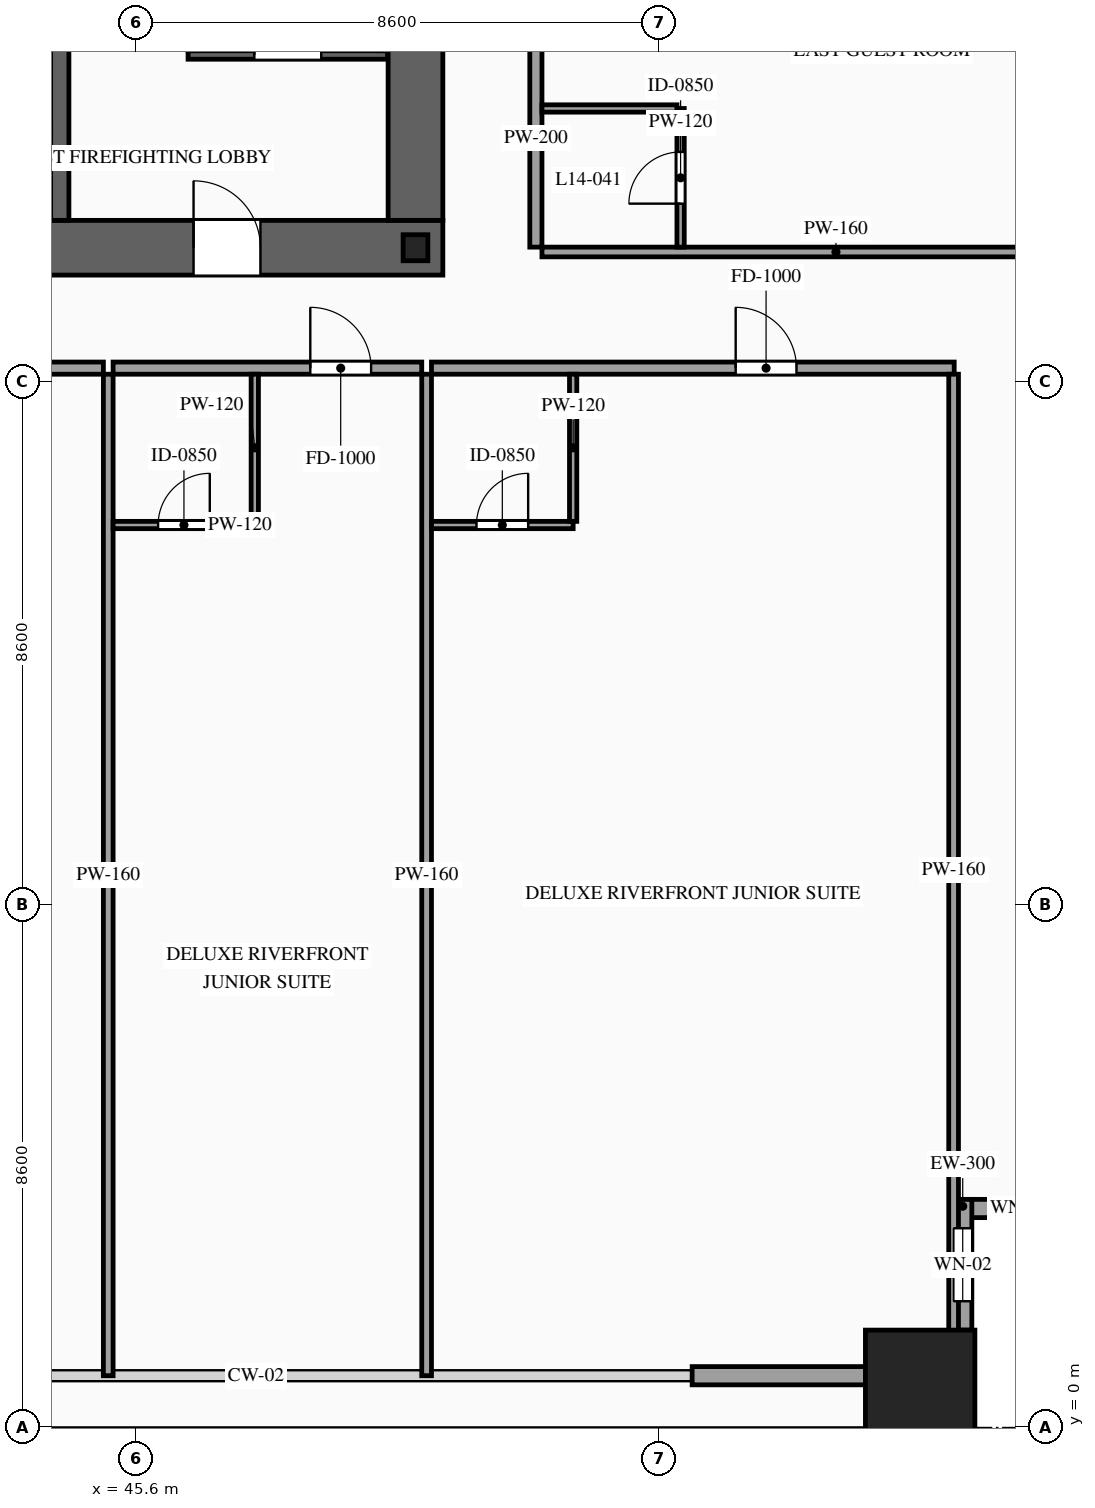
"""IFC4 building model, lengths in metres.
Left out: names, types, materials, properties, quantities, classifications, styles, units other than length and angle.
Written with IfcOpenShell. Run it as: python <this file> out.ifc"""

import sys

from ifc_helpers import new_model, si_unit, direction, frame, frame_2d, origin, origin_2d, place, context, subcontext, project, spatial, rectangle, hollow_rectangle, i_section, extrude, source, transform, mapped, element, fill, save


model = new_model("IFC4")
c1 = context("Model", 3, precision=1e-05, world=origin(), true_north=direction((0.0, 1.0)))
c2 = subcontext(c1, "Body", "Model", "MODEL_VIEW")
j1 = project(units=[si_unit("LENGTHUNIT", "METRE"), si_unit("PLANEANGLEUNIT", "RADIAN")], contexts=[c1])
p1 = place(None, origin())
s1 = spatial("IfcSite", under=j1, at=p1, CompositionType="ELEMENT")
p2 = place(p1, origin())
s2 = spatial("IfcBuilding", under=s1, at=p2, CompositionType="ELEMENT")
p3 = place(p2, frame((0.0, 0.0, 56.8)))
s3 = spatial("IfcBuildingStorey", under=s2, at=p3, CompositionType="ELEMENT", Elevation=56.8)
p4 = place(p3, frame((23.35, 19.4, 0.0), z_axis=(0.0, 0.0, 1.0), x_axis=(1.0, 0.0, 0.0)))
e1 = element("IfcWall", 1, at=p4, inside=s3, PredefinedType="SHEAR", context=c2, shape_type="SweptSolid", body=[
    extrude(rectangle(XDim=27.3, YDim=0.9, at=frame_2d((13.65, 0.0))), origin(), (0.0, 0.0, 1.0), 3.6),
])
p5 = place(p4, frame((2.1, 0.0, 0.0)))
e2 = element("IfcOpeningElement", 2, at=p5, cuts=e1, PredefinedType="OPENING", context=c2, shape_type="SweptSolid", body=[
    extrude(rectangle(XDim=1.1, YDim=2.2, at=frame_2d((0.55, 1.1))), frame((0.0, 0.465, 0.0), z_axis=(0.0, -1.0, 0.0), x_axis=(1.0, 0.0, 0.0)), (0.0, 0.0, 1.0), 0.93),
])
p6 = place(p4, frame((10.0, 0.0, 0.0)))
e3 = element("IfcOpeningElement", 3, at=p6, cuts=e1, PredefinedType="OPENING", context=c2, shape_type="SweptSolid", body=[
    extrude(rectangle(XDim=1.1, YDim=2.2, at=frame_2d((0.55, 1.1))), frame((0.0, 0.465, 0.0), z_axis=(0.0, -1.0, 0.0), x_axis=(1.0, 0.0, 0.0)), (0.0, 0.0, 1.0), 0.93),
])
p7 = place(p4, frame((23.2, 0.0, 0.0)))
e4 = element("IfcOpeningElement", 4, at=p7, cuts=e1, PredefinedType="OPENING", context=c2, shape_type="SweptSolid", body=[
    extrude(rectangle(XDim=1.1, YDim=2.2, at=frame_2d((0.55, 1.1))), frame((0.0, 0.465, 0.0), z_axis=(0.0, -1.0, 0.0), x_axis=(1.0, 0.0, 0.0)), (0.0, 0.0, 1.0), 0.93),
])
p8 = place(p4, frame((19.82, 0.0, 0.0)))
e5 = element("IfcOpeningElement", 5, at=p8, cuts=e1, PredefinedType="OPENING", context=c2, shape_type="SweptSolid", body=[
    extrude(rectangle(XDim=0.9, YDim=2.15, at=frame_2d((0.45, 1.075))), frame((0.0, 0.465, 0.0), z_axis=(0.0, -1.0, 0.0), x_axis=(1.0, 0.0, 0.0)), (0.0, 0.0, 1.0), 0.93),
])
p9 = place(p4, frame((18.38, 0.0, 0.0)))
e6 = element("IfcOpeningElement", 6, at=p9, cuts=e1, PredefinedType="OPENING", context=c2, shape_type="SweptSolid", body=[
    extrude(rectangle(XDim=0.9, YDim=2.15, at=frame_2d((0.45, 1.075))), frame((0.0, 0.465, 0.0), z_axis=(0.0, -1.0, 0.0), x_axis=(1.0, 0.0, 0.0)), (0.0, 0.0, 1.0), 0.93),
])
m1 = source(origin(), c2, "Body", "SweptSolid", [
    extrude(rectangle(XDim=11.9, YDim=0.9, at=frame_2d((5.95, 0.0))), origin(), (0.0, 0.0, 1.0), 3.6),
])
p10 = place(p3, frame((50.2, 19.85, 0.0), z_axis=(0.0, 0.0, 1.0), x_axis=(0.0, 1.0, 0.0)))
e7 = element("IfcWall", 7, at=p10, inside=s3, PredefinedType="SHEAR", context=c2, shape_type="MappedRepresentation", body=[
    mapped(m1, transform((0.0, 0.0, 0.0), scale=1.0)),
])
m2 = source(origin(), c2, "Body", "SweptSolid", [
    extrude(rectangle(XDim=11.9, YDim=0.3, at=frame_2d((5.95, 0.0))), origin(), (0.0, 0.0, 1.0), 3.6),
])
p11 = place(p3, frame((44.35, 19.85, 0.0), z_axis=(0.0, 0.0, 1.0), x_axis=(0.0, 1.0, 0.0)))
e8 = element("IfcWall", 8, at=p11, inside=s3, PredefinedType="SOLIDWALL", context=c2, shape_type="MappedRepresentation", body=[
    mapped(m2, transform((0.0, 0.0, 0.0), scale=1.0)),
])
m3 = source(origin(), c2, "Body", "SweptSolid", [
    extrude(i_section(OverallWidth=0.407, OverallDepth=0.428, WebThickness=0.02, FlangeThickness=0.035, at=origin_2d()), origin(), (0.0, 0.0, 1.0), 3.6),
])
p12 = place(p3, frame((50.2, 19.4, 0.0), z_axis=(0.0, 0.0, 1.0), x_axis=(1.0, 0.0, 0.0)))
e9 = element("IfcColumn", 9, at=p12, inside=s3, PredefinedType="COLUMN", context=c2, shape_type="MappedRepresentation", body=[
    mapped(m3, transform((0.0, 0.0, 0.0), scale=1.0)),
])
m4 = source(origin(), c2, "Body", "SweptSolid", [
    extrude(hollow_rectangle(XDim=1.8, YDim=1.8, WallThickness=0.08, at=origin_2d()), origin(), (0.0, 0.0, 1.0), 3.6),
])
p13 = place(p3, frame((58.5, 0.7, 0.0), z_axis=(0.0, 0.0, 1.0), x_axis=(1.0, 0.0, 0.0)))
e10 = element("IfcColumn", 10, at=p13, inside=s3, PredefinedType="COLUMN", context=c2, shape_type="MappedRepresentation", body=[
    mapped(m4, transform((0.0, 0.0, 0.0), scale=1.0)),
])
p14 = place(p3, frame((59.05, 3.6, 0.0), z_axis=(0.0, 0.0, 1.0), x_axis=(1.0, 0.0, 0.0)))
e11 = element("IfcWall", 11, at=p14, inside=s3, PredefinedType="SOLIDWALL", context=c2, shape_type="SweptSolid", body=[
    extrude(rectangle(XDim=2.15, YDim=0.3, at=frame_2d((1.075, 0.0))), origin(), (0.0, 0.0, 1.0), 3.38),
])
p15 = place(p14, frame((0.625, 0.0, 0.85)))
e12 = element("IfcOpeningElement", 12, at=p15, cuts=e11, PredefinedType="OPENING", context=c2, shape_type="SweptSolid", body=[
    extrude(rectangle(XDim=0.9, YDim=1.5, at=frame_2d((0.45, 0.75))), frame((0.0, 0.165, 0.0), z_axis=(0.0, -1.0, 0.0), x_axis=(1.0, 0.0, 0.0)), (0.0, 0.0, 1.0), 0.33),
])
p16 = place(p3, frame((59.2, 1.6, 0.0), z_axis=(0.0, 0.0, 1.0), x_axis=(0.0, 1.0, 0.0)))
e13 = element("IfcWall", 13, at=p16, inside=s3, PredefinedType="SOLIDWALL", context=c2, shape_type="SweptSolid", body=[
    extrude(rectangle(XDim=2.15, YDim=0.3, at=frame_2d((1.075, 0.0))), origin(), (0.0, 0.0, 1.0), 3.38),
])
p17 = place(p16, frame((0.475, 0.0, 0.85)))
e14 = element("IfcOpeningElement", 14, at=p17, cuts=e13, PredefinedType="OPENING", context=c2, shape_type="SweptSolid", body=[
    extrude(rectangle(XDim=1.2, YDim=2.1, at=frame_2d((0.6, 1.05))), frame((0.0, 0.165, 0.0), z_axis=(0.0, -1.0, 0.0), x_axis=(1.0, 0.0, 0.0)), (0.0, 0.0, 1.0), 0.33),
])
m5 = source(origin(), c2, "Body", "SweptSolid", [
    extrude(rectangle(XDim=2.85, YDim=0.3, at=frame_2d((1.425, 0.0))), origin(), (0.0, 0.0, 1.0), 2.775),
])
p18 = place(p3, frame((54.75, 0.85, 0.0), z_axis=(0.0, 0.0, 1.0), x_axis=(1.0, 0.0, 0.0)))
e15 = element("IfcWall", 15, at=p18, inside=s3, PredefinedType="SOLIDWALL", context=c2, shape_type="MappedRepresentation", body=[
    mapped(m5, transform((0.0, 0.0, 0.0), scale=1.0)),
])
p19 = place(p3, frame((46.46, 22.57, 0.0), z_axis=(0.0, 0.0, 1.0), x_axis=(1.0, 0.0, 0.0)))
e16 = element("IfcWall", 16, at=p19, inside=s3, PredefinedType="SOLIDWALL", context=c2, shape_type="SweptSolid", body=[
    extrude(rectangle(XDim=3.28, YDim=0.14, at=frame_2d((1.64, 0.0))), origin(), (0.0, 0.0, 1.0), 3.38),
])
p20 = place(p19, frame((1.09, 0.0, 0.0)))
e17 = element("IfcOpeningElement", 17, at=p20, cuts=e16, PredefinedType="OPENING", context=c2, shape_type="SweptSolid", body=[
    extrude(rectangle(XDim=1.1, YDim=2.2, at=frame_2d((0.55, 1.1))), frame((0.0, 0.085, 0.0), z_axis=(0.0, -1.0, 0.0), x_axis=(1.0, 0.0, 0.0)), (0.0, 0.0, 1.0), 0.17),
])
p21 = place(p3, frame((35.756, 17.42, 0.0), z_axis=(0.0, 0.0, 1.0), x_axis=(1.0, 0.0, 0.0)))
e18 = element("IfcWall", 18, at=p21, inside=s3, PredefinedType="PARTITIONING", context=c2, shape_type="SweptSolid", body=[
    extrude(rectangle(XDim=9.311, YDim=0.2, at=frame_2d((4.655, 0.0))), origin(), (0.0, 0.0, 1.0), 3.38),
])
p22 = place(p21, frame((5.361, 0.0, 0.0)))
e19 = element("IfcOpeningElement", 19, at=p22, cuts=e18, PredefinedType="OPENING", context=c2, shape_type="SweptSolid", body=[
    extrude(rectangle(XDim=1.0, YDim=2.2, at=frame_2d((0.5, 1.1))), frame((0.0, 0.115, 0.0), z_axis=(0.0, -1.0, 0.0), x_axis=(1.0, 0.0, 0.0)), (0.0, 0.0, 1.0), 0.23),
])
m6 = source(origin(), c2, "Body", "SweptSolid", [
    extrude(rectangle(XDim=16.47, YDim=0.16, at=frame_2d((8.235, 0.0))), origin(), (0.0, 0.0, 1.0), 3.38),
])
p23 = place(p3, frame((45.147, 0.85, 0.0), z_axis=(0.0, 0.0, 1.0), x_axis=(0.0, 1.0, 0.0)))
e20 = element("IfcWall", 20, at=p23, inside=s3, PredefinedType="PARTITIONING", context=c2, shape_type="MappedRepresentation", body=[
    mapped(m6, transform((0.0, 0.0, 0.0), scale=1.0)),
])
p24 = place(p3, frame((45.227, 17.42, 0.0), z_axis=(0.0, 0.0, 1.0), x_axis=(1.0, 0.0, 0.0)))
e21 = element("IfcWall", 21, at=p24, inside=s3, PredefinedType="PARTITIONING", context=c2, shape_type="SweptSolid", body=[
    extrude(rectangle(XDim=5.076, YDim=0.2, at=frame_2d((2.538, 0.0))), origin(), (0.0, 0.0, 1.0), 3.38),
])
p25 = place(p24, frame((3.243, 0.0, 0.0)))
e22 = element("IfcOpeningElement", 22, at=p25, cuts=e21, PredefinedType="OPENING", context=c2, shape_type="SweptSolid", body=[
    extrude(rectangle(XDim=1.0, YDim=2.2, at=frame_2d((0.5, 1.1))), frame((0.0, 0.115, 0.0), z_axis=(0.0, -1.0, 0.0), x_axis=(1.0, 0.0, 0.0)), (0.0, 0.0, 1.0), 0.23),
])
p26 = place(p3, frame((50.383, 0.85, 0.0), z_axis=(0.0, 0.0, 1.0), x_axis=(0.0, 1.0, 0.0)))
e23 = element("IfcWall", 23, at=p26, inside=s3, PredefinedType="PARTITIONING", context=c2, shape_type="MappedRepresentation", body=[
    mapped(m6, transform((0.0, 0.0, 0.0), scale=1.0)),
])
p27 = place(p3, frame((45.227, 14.84, 0.0), z_axis=(0.0, 0.0, 1.0), x_axis=(1.0, 0.0, 0.0)))
e24 = element("IfcWall", 24, at=p27, inside=s3, PredefinedType="PARTITIONING", context=c2, shape_type="SweptSolid", body=[
    extrude(rectangle(XDim=2.33, YDim=0.12, at=frame_2d((1.165, 0.0))), origin(), (0.0, 0.0, 1.0), 3.38),
])
p28 = place(p27, frame((0.74, 0.0, 0.0)))
e25 = element("IfcOpeningElement", 25, at=p28, cuts=e24, PredefinedType="OPENING", context=c2, shape_type="SweptSolid", body=[
    extrude(rectangle(XDim=0.85, YDim=2.1, at=frame_2d((0.425, 1.05))), frame((0.0, 0.075, 0.0), z_axis=(0.0, -1.0, 0.0), x_axis=(1.0, 0.0, 0.0)), (0.0, 0.0, 1.0), 0.15),
])
m7 = source(origin(), c2, "Body", "SweptSolid", [
    extrude(rectangle(XDim=2.42, YDim=0.12, at=frame_2d((1.21, 0.0))), origin(), (0.0, 0.0, 1.0), 3.38),
])
p29 = place(p3, frame((47.557, 14.9, 0.0), z_axis=(0.0, 0.0, 1.0), x_axis=(0.0, 1.0, 0.0)))
e26 = element("IfcWall", 26, at=p29, inside=s3, PredefinedType="PARTITIONING", context=c2, shape_type="MappedRepresentation", body=[
    mapped(m7, transform((0.0, 0.0, 0.0), scale=1.0)),
])
p30 = place(p3, frame((50.463, 17.42, 0.0), z_axis=(0.0, 0.0, 1.0), x_axis=(1.0, 0.0, 0.0)))
e27 = element("IfcWall", 27, at=p30, inside=s3, PredefinedType="PARTITIONING", context=c2, shape_type="SweptSolid", body=[
    extrude(rectangle(XDim=8.597, YDim=0.2, at=frame_2d((4.299, 0.0))), origin(), (0.0, 0.0, 1.0), 3.38),
])
p31 = place(p30, frame((5.003, 0.0, 0.0)))
e28 = element("IfcOpeningElement", 28, at=p31, cuts=e27, PredefinedType="OPENING", context=c2, shape_type="SweptSolid", body=[
    extrude(rectangle(XDim=1.0, YDim=2.2, at=frame_2d((0.5, 1.1))), frame((0.0, 0.115, 0.0), z_axis=(0.0, -1.0, 0.0), x_axis=(1.0, 0.0, 0.0)), (0.0, 0.0, 1.0), 0.23),
])
m8 = source(origin(), c2, "Body", "SweptSolid", [
    extrude(rectangle(XDim=16.32, YDim=0.16, at=frame_2d((8.16, 0.0))), origin(), (0.0, 0.0, 1.0), 3.38),
])
p32 = place(p3, frame((59.05, 1.0, 0.0), z_axis=(0.0, 0.0, 1.0), x_axis=(0.0, 1.0, 0.0)))
e29 = element("IfcWall", 29, at=p32, inside=s3, PredefinedType="PARTITIONING", context=c2, shape_type="MappedRepresentation", body=[
    mapped(m8, transform((0.0, 0.0, 0.0), scale=1.0)),
])
p33 = place(p3, frame((50.463, 14.84, 0.0), z_axis=(0.0, 0.0, 1.0), x_axis=(1.0, 0.0, 0.0)))
e30 = element("IfcWall", 30, at=p33, inside=s3, PredefinedType="PARTITIONING", context=c2, shape_type="SweptSolid", body=[
    extrude(rectangle(XDim=2.33, YDim=0.12, at=frame_2d((1.165, 0.0))), origin(), (0.0, 0.0, 1.0), 3.38),
])
p34 = place(p33, frame((0.74, 0.0, 0.0)))
e31 = element("IfcOpeningElement", 31, at=p34, cuts=e30, PredefinedType="OPENING", context=c2, shape_type="SweptSolid", body=[
    extrude(rectangle(XDim=0.85, YDim=2.1, at=frame_2d((0.425, 1.05))), frame((0.0, 0.075, 0.0), z_axis=(0.0, -1.0, 0.0), x_axis=(1.0, 0.0, 0.0)), (0.0, 0.0, 1.0), 0.15),
])
p35 = place(p3, frame((52.793, 14.9, 0.0), z_axis=(0.0, 0.0, 1.0), x_axis=(0.0, 1.0, 0.0)))
e32 = element("IfcWall", 32, at=p35, inside=s3, PredefinedType="PARTITIONING", context=c2, shape_type="MappedRepresentation", body=[
    mapped(m7, transform((0.0, 0.0, 0.0), scale=1.0)),
])
p36 = place(p3, frame((52.18, 19.41, 0.0), z_axis=(0.0, 0.0, 1.0), x_axis=(0.0, 1.0, 0.0)))
e33 = element("IfcWall", 33, at=p36, inside=s3, PredefinedType="PARTITIONING", context=c2, shape_type="SweptSolid", body=[
    extrude(rectangle(XDim=6.31, YDim=0.2, at=frame_2d((3.155, 0.0))), origin(), (0.0, 0.0, 1.0), 3.38),
])
p37 = place(p36, frame((3.835, 0.0, 0.0)))
e34 = element("IfcOpeningElement", 34, at=p37, cuts=e33, PredefinedType="OPENING", context=c2, shape_type="SweptSolid", body=[
    extrude(rectangle(XDim=1.0, YDim=2.2, at=frame_2d((0.5, 1.1))), frame((0.0, 0.115, 0.0), z_axis=(0.0, -1.0, 0.0), x_axis=(1.0, 0.0, 0.0)), (0.0, 0.0, 1.0), 0.23),
])
m9 = source(origin(), c2, "Body", "SweptSolid", [
    extrude(rectangle(XDim=9.67, YDim=0.16, at=frame_2d((4.835, 0.0))), origin(), (0.0, 0.0, 1.0), 2.875),
])
p38 = place(p3, frame((52.28, 19.33, 0.0), z_axis=(0.0, 0.0, 1.0), x_axis=(1.0, 0.0, 0.0)))
e35 = element("IfcWall", 35, at=p38, inside=s3, PredefinedType="PARTITIONING", context=c2, shape_type="MappedRepresentation", body=[
    mapped(m9, transform((0.0, 0.0, 0.0), scale=1.0)),
])
p39 = place(p3, frame((54.56, 19.41, 0.0), z_axis=(0.0, 0.0, 1.0), x_axis=(0.0, 1.0, 0.0)))
e36 = element("IfcWall", 36, at=p39, inside=s3, PredefinedType="PARTITIONING", context=c2, shape_type="SweptSolid", body=[
    extrude(rectangle(XDim=2.28, YDim=0.12, at=frame_2d((1.14, 0.0))), origin(), (0.0, 0.0, 1.0), 3.38),
])
p40 = place(p39, frame((0.715, 0.0, 0.0)))
e37 = element("IfcOpeningElement", 37, at=p40, cuts=e36, PredefinedType="OPENING", context=c2, shape_type="SweptSolid", body=[
    extrude(rectangle(XDim=0.85, YDim=2.1, at=frame_2d((0.425, 1.05))), frame((0.0, 0.075, 0.0), z_axis=(0.0, -1.0, 0.0), x_axis=(1.0, 0.0, 0.0)), (0.0, 0.0, 1.0), 0.15),
])
m10 = source(origin(), c2, "Body", "SweptSolid", [
    extrude(rectangle(XDim=2.22, YDim=0.12, at=frame_2d((1.11, 0.0))), origin(), (0.0, 0.0, 1.0), 3.38),
])
p41 = place(p3, frame((52.28, 21.69, 0.0), z_axis=(0.0, 0.0, 1.0), x_axis=(1.0, 0.0, 0.0)))
e38 = element("IfcWall", 38, at=p41, inside=s3, PredefinedType="PARTITIONING", context=c2, shape_type="MappedRepresentation", body=[
    mapped(m10, transform((0.0, 0.0, 0.0), scale=1.0)),
])
m11 = source(origin(), c2, "Body", "SweptSolid", [
    extrude(rectangle(XDim=0.9, YDim=1.5, at=frame_2d((0.45, 0.75))), frame((0.0, 0.03, 0.0), z_axis=(0.0, -1.0, 0.0), x_axis=(1.0, 0.0, 0.0)), (0.0, 0.0, 1.0), 0.06),
])
p42 = place(p15, origin())
e39 = element("IfcWindow", 39, at=p42, inside=s3, PartitioningType="SINGLE_PANEL", PredefinedType="WINDOW", context=c2, shape_type="MappedRepresentation", body=[
    mapped(m11, transform((0.0, 0.0, 0.0), scale=1.0)),
])
fill(e12, e39)
m12 = source(origin(), c2, "Body", "SweptSolid", [
    extrude(rectangle(XDim=1.2, YDim=2.1, at=frame_2d((0.6, 1.05))), frame((0.0, 0.03, 0.0), z_axis=(0.0, -1.0, 0.0), x_axis=(1.0, 0.0, 0.0)), (0.0, 0.0, 1.0), 0.06),
])
p43 = place(p17, origin())
e40 = element("IfcWindow", 40, at=p43, inside=s3, PartitioningType="SINGLE_PANEL", PredefinedType="WINDOW", context=c2, shape_type="MappedRepresentation", body=[
    mapped(m12, transform((0.0, 0.0, 0.0), scale=1.0)),
])
fill(e14, e40)
m13 = source(origin(), c2, "Body", "SweptSolid", [
    extrude(rectangle(XDim=1.1, YDim=2.2, at=frame_2d((0.55, 1.1))), frame((0.0, 0.025, 0.0), z_axis=(0.0, -1.0, 0.0), x_axis=(1.0, 0.0, 0.0)), (0.0, 0.0, 1.0), 0.05),
])
p44 = place(p20, origin())
e41 = element("IfcDoor", 41, at=p44, inside=s3, OperationType="SINGLE_SWING_LEFT", PredefinedType="DOOR", context=c2, shape_type="MappedRepresentation", body=[
    mapped(m13, transform((0.0, 0.0, 0.0), scale=1.0)),
])
fill(e17, e41)
p45 = place(p7, origin())
e42 = element("IfcDoor", 42, at=p45, inside=s3, OperationType="SINGLE_SWING_LEFT", PredefinedType="DOOR", context=c2, shape_type="MappedRepresentation", body=[
    mapped(m13, transform((0.0, 0.0, 0.0), scale=1.0)),
])
fill(e4, e42)
m14 = source(origin(), c2, "Body", "SweptSolid", [
    extrude(rectangle(XDim=1.0, YDim=2.2, at=frame_2d((0.5, 1.1))), frame((0.0, 0.025, 0.0), z_axis=(0.0, -1.0, 0.0), x_axis=(1.0, 0.0, 0.0)), (0.0, 0.0, 1.0), 0.05),
])
p46 = place(p25, origin())
e43 = element("IfcDoor", 43, at=p46, inside=s3, OperationType="SINGLE_SWING_LEFT", PredefinedType="DOOR", context=c2, shape_type="MappedRepresentation", body=[
    mapped(m14, transform((0.0, 0.0, 0.0), scale=1.0)),
])
fill(e22, e43)
m15 = source(origin(), c2, "Body", "SweptSolid", [
    extrude(rectangle(XDim=0.85, YDim=2.1, at=frame_2d((0.425, 1.05))), frame((0.0, 0.025, 0.0), z_axis=(0.0, -1.0, 0.0), x_axis=(1.0, 0.0, 0.0)), (0.0, 0.0, 1.0), 0.05),
])
p47 = place(p28, origin())
e44 = element("IfcDoor", 44, at=p47, inside=s3, OperationType="SINGLE_SWING_RIGHT", PredefinedType="DOOR", context=c2, shape_type="MappedRepresentation", body=[
    mapped(m15, transform((0.0, 0.0, 0.0), scale=1.0)),
])
fill(e25, e44)
p48 = place(p31, origin())
e45 = element("IfcDoor", 45, at=p48, inside=s3, OperationType="SINGLE_SWING_LEFT", PredefinedType="DOOR", context=c2, shape_type="MappedRepresentation", body=[
    mapped(m14, transform((0.0, 0.0, 0.0), scale=1.0)),
])
fill(e28, e45)
p49 = place(p34, origin())
e46 = element("IfcDoor", 46, at=p49, inside=s3, OperationType="SINGLE_SWING_RIGHT", PredefinedType="DOOR", context=c2, shape_type="MappedRepresentation", body=[
    mapped(m15, transform((0.0, 0.0, 0.0), scale=1.0)),
])
fill(e31, e46)
p50 = place(p40, origin())
e47 = element("IfcDoor", 47, at=p50, inside=s3, OperationType="SINGLE_SWING_LEFT", PredefinedType="DOOR", context=c2, shape_type="MappedRepresentation", body=[
    mapped(m15, transform((0.0, 0.0, 0.0), scale=1.0)),
])
fill(e37, e47)
save(model, sys.argv[1])
